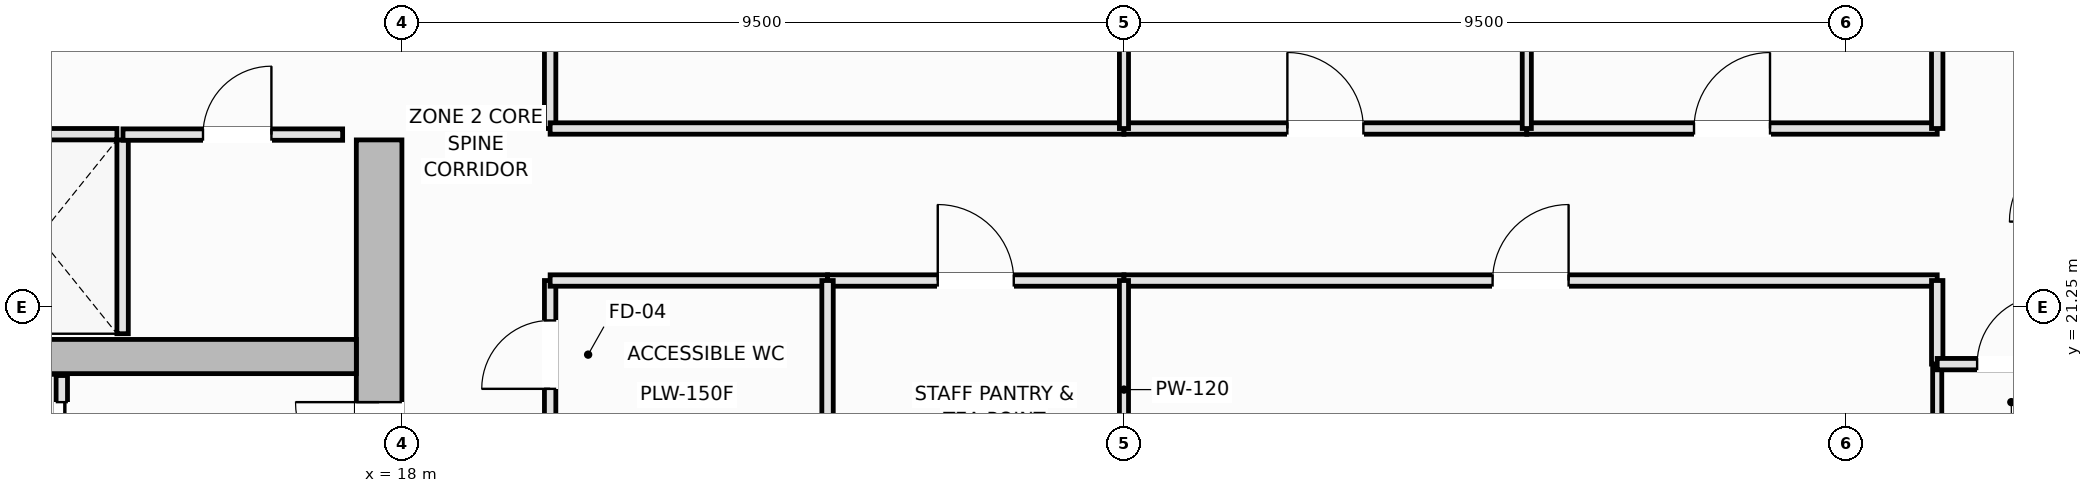
"""IFC4 building model, lengths in metres.
Left out: names, types, materials, properties, quantities, classifications, styles, units other than length and angle.
Written with IfcOpenShell. Run it as: python <this file> out.ifc"""

import sys

from ifc_helpers import new_model, si_unit, direction, frame, frame_2d, origin, place, context, subcontext, project, spatial, rectangle, extrude, element, fill, save


model = new_model("IFC4")
c1 = context("Model", 3, precision=1e-05, world=origin(), true_north=direction((0.0, 1.0)))
c2 = subcontext(c1, "Body", "Model", "MODEL_VIEW")
j1 = project(units=[si_unit("LENGTHUNIT", "METRE"), si_unit("PLANEANGLEUNIT", "RADIAN")], contexts=[c1])
p1 = place(None, origin())
s1 = spatial("IfcSite", under=j1, at=p1, CompositionType="ELEMENT")
p2 = place(p1, origin())
s2 = spatial("IfcBuilding", under=s1, at=p2, CompositionType="ELEMENT")
p3 = place(p2, frame((0.0, 0.0, 169.7)))
s3 = spatial("IfcBuildingStorey", under=s2, at=p3, CompositionType="ELEMENT", Elevation=169.7)
p4 = place(p3, frame((17.7, 14.6, 0.0), z_axis=(0.0, 0.0, 1.0), x_axis=(0.0, 1.0, 0.0)))
e1 = element("IfcWall", 1, at=p4, inside=s3, PredefinedType="SHEAR", context=c2, shape_type="SweptSolid", body=[
    extrude(rectangle(XDim=8.85, YDim=0.6, at=frame_2d((4.425, 0.0))), origin(), (0.0, 0.0, 1.0), 3.55),
])
p5 = place(p4, frame((4.3, 0.0, 0.0)))
e2 = element("IfcOpeningElement", 2, at=p5, cuts=e1, PredefinedType="OPENING", context=c2, shape_type="SweptSolid", body=[
    extrude(rectangle(XDim=1.1, YDim=2.15, at=frame_2d((0.55, 1.075))), frame((0.0, 0.31, 0.0), z_axis=(0.0, -1.0, 0.0), x_axis=(1.0, 0.0, 0.0)), (0.0, 0.0, 1.0), 0.62),
])
p6 = place(p3, frame((5.1, 20.6, 0.0), z_axis=(0.0, 0.0, 1.0), x_axis=(1.0, 0.0, 0.0)))
e3 = element("IfcWall", 3, at=p6, inside=s3, PredefinedType="SHEAR", context=c2, shape_type="SweptSolid", body=[
    extrude(rectangle(XDim=12.3, YDim=0.45, at=frame_2d((6.15, 0.0))), origin(), (0.0, 0.0, 1.0), 3.55),
])
p7 = place(p3, frame((12.2, 23.525, 0.0), z_axis=(0.0, 0.0, 1.0), x_axis=(1.0, 0.0, 0.0)))
e4 = element("IfcWall", 4, at=p7, inside=s3, PredefinedType="PARTITIONING", context=c2, shape_type="SweptSolid", body=[
    extrude(rectangle(XDim=2.05, YDim=0.15, at=frame_2d((1.025, 0.0))), origin(), (0.0, 0.0, 1.0), 3.35),
])
p8 = place(p3, frame((14.325, 20.9, 0.0), z_axis=(0.0, 0.0, 1.0), x_axis=(0.0, 1.0, 0.0)))
e5 = element("IfcWall", 5, at=p8, inside=s3, PredefinedType="PARTITIONING", context=c2, shape_type="SweptSolid", body=[
    extrude(rectangle(XDim=2.55, YDim=0.15, at=frame_2d((1.275, 0.0))), origin(), (0.0, 0.0, 1.0), 3.35),
])
p9 = place(p3, frame((13.525, 18.55, 0.0), z_axis=(0.0, 0.0, 1.0), x_axis=(0.0, 1.0, 0.0)))
e6 = element("IfcWall", 6, at=p9, inside=s3, PredefinedType="PARTITIONING", context=c2, shape_type="SweptSolid", body=[
    extrude(rectangle(XDim=1.8, YDim=0.15, at=frame_2d((0.9, 0.0))), origin(), (0.0, 0.0, 1.0), 3.35),
])
p10 = place(p9, frame((0.35, 0.0, 0.0)))
e7 = element("IfcOpeningElement", 7, at=p10, cuts=e6, PredefinedType="OPENING", context=c2, shape_type="SweptSolid", body=[
    extrude(rectangle(XDim=1.1, YDim=2.2, at=frame_2d((0.55, 1.1))), frame((0.0, 0.085, 0.0), z_axis=(0.0, -1.0, 0.0), x_axis=(1.0, 0.0, 0.0)), (0.0, 0.0, 1.0), 0.17),
])
p11 = place(p3, frame((14.33, 23.52, 0.0), z_axis=(0.0, 0.0, 1.0), x_axis=(1.0, 0.0, 0.0)))
e8 = element("IfcWall", 8, at=p11, inside=s3, PredefinedType="PARTITIONING", context=c2, shape_type="SweptSolid", body=[
    extrude(rectangle(XDim=2.89, YDim=0.15, at=frame_2d((1.445, 0.0))), origin(), (0.0, 0.0, 1.0), 3.35),
])
p12 = place(p11, frame((1.053, 0.0, 0.0)))
e9 = element("IfcOpeningElement", 9, at=p12, cuts=e8, PredefinedType="OPENING", context=c2, shape_type="SweptSolid", body=[
    extrude(rectangle(XDim=0.9, YDim=2.1, at=frame_2d((0.45, 1.05))), frame((0.0, 0.085, 0.0), z_axis=(0.0, -1.0, 0.0), x_axis=(1.0, 0.0, 0.0)), (0.0, 0.0, 1.0), 0.17),
])
p13 = place(p3, frame((19.95, 19.65, 0.0), z_axis=(0.0, 0.0, 1.0), x_axis=(0.0, 1.0, 0.0)))
e10 = element("IfcWall", 10, at=p13, inside=s3, PredefinedType="PLUMBINGWALL", context=c2, shape_type="SweptSolid", body=[
    extrude(rectangle(XDim=1.95, YDim=0.15, at=frame_2d((0.975, 0.0))), origin(), (0.0, 0.0, 1.0), 3.35),
])
p14 = place(p13, frame((0.525, 0.0, 0.0)))
e11 = element("IfcOpeningElement", 11, at=p14, cuts=e10, PredefinedType="OPENING", context=c2, shape_type="SweptSolid", body=[
    extrude(rectangle(XDim=0.9, YDim=2.1, at=frame_2d((0.45, 1.05))), frame((0.0, 0.085, 0.0), z_axis=(0.0, -1.0, 0.0), x_axis=(1.0, 0.0, 0.0)), (0.0, 0.0, 1.0), 0.17),
])
p15 = place(p3, frame((19.95, 23.6, 0.0), z_axis=(0.0, 0.0, 1.0), x_axis=(0.0, 1.0, 0.0)))
e12 = element("IfcWall", 12, at=p15, inside=s3, PredefinedType="PARTITIONING", context=c2, shape_type="SweptSolid", body=[
    extrude(rectangle(XDim=5.2, YDim=0.15, at=frame_2d((2.6, 0.0))), origin(), (0.0, 0.0, 1.0), 3.35),
])
p16 = place(p15, frame((2.1, 0.0, 0.0)))
e13 = element("IfcOpeningElement", 13, at=p16, cuts=e12, PredefinedType="OPENING", context=c2, shape_type="SweptSolid", body=[
    extrude(rectangle(XDim=1.0, YDim=2.15, at=frame_2d((0.5, 1.075))), frame((0.0, 0.085, 0.0), z_axis=(0.0, -1.0, 0.0), x_axis=(1.0, 0.0, 0.0)), (0.0, 0.0, 1.0), 0.17),
])
p17 = place(p3, frame((19.95, 21.6, 0.0), z_axis=(0.0, 0.0, 1.0), x_axis=(1.0, 0.0, 0.0)))
e14 = element("IfcWall", 14, at=p17, inside=s3, PredefinedType="PLUMBINGWALL", context=c2, shape_type="SweptSolid", body=[
    extrude(rectangle(XDim=3.65, YDim=0.15, at=frame_2d((1.825, 0.0))), origin(), (0.0, 0.0, 1.0), 3.35),
])
p18 = place(p3, frame((23.6, 21.6, 0.0), z_axis=(0.0, 0.0, 1.0), x_axis=(1.0, 0.0, 0.0)))
e15 = element("IfcWall", 15, at=p18, inside=s3, PredefinedType="PARTITIONING", context=c2, shape_type="SweptSolid", body=[
    extrude(rectangle(XDim=3.9, YDim=0.15, at=frame_2d((1.95, 0.0))), origin(), (0.0, 0.0, 1.0), 3.35),
])
p19 = place(p18, frame((1.45, 0.0, 0.0)))
e16 = element("IfcOpeningElement", 16, at=p19, cuts=e15, PredefinedType="OPENING", context=c2, shape_type="SweptSolid", body=[
    extrude(rectangle(XDim=1.0, YDim=2.15, at=frame_2d((0.5, 1.075))), frame((0.0, 0.085, 0.0), z_axis=(0.0, -1.0, 0.0), x_axis=(1.0, 0.0, 0.0)), (0.0, 0.0, 1.0), 0.17),
])
p20 = place(p3, frame((19.95, 23.6, 0.0), z_axis=(0.0, 0.0, 1.0), x_axis=(1.0, 0.0, 0.0)))
e17 = element("IfcWall", 17, at=p20, inside=s3, PredefinedType="PARTITIONING", context=c2, shape_type="SweptSolid", body=[
    extrude(rectangle(XDim=7.55, YDim=0.15, at=frame_2d((3.775, 0.0))), origin(), (0.0, 0.0, 1.0), 3.35),
])
p21 = place(p3, frame((27.5, 21.6, 0.0), z_axis=(0.0, 0.0, 1.0), x_axis=(1.0, 0.0, 0.0)))
e18 = element("IfcWall", 18, at=p21, inside=s3, PredefinedType="PARTITIONING", context=c2, shape_type="SweptSolid", body=[
    extrude(rectangle(XDim=10.7, YDim=0.15, at=frame_2d((5.35, 0.0))), origin(), (0.0, 0.0, 1.0), 3.35),
])
p22 = place(p21, frame((4.85, 0.0, 0.0)))
e19 = element("IfcOpeningElement", 19, at=p22, cuts=e18, PredefinedType="OPENING", context=c2, shape_type="SweptSolid", body=[
    extrude(rectangle(XDim=1.0, YDim=2.15, at=frame_2d((0.5, 1.075))), frame((0.0, 0.085, 0.0), z_axis=(0.0, -1.0, 0.0), x_axis=(1.0, 0.0, 0.0)), (0.0, 0.0, 1.0), 0.17),
])
p23 = place(p3, frame((27.5, 23.6, 0.0), z_axis=(0.0, 0.0, 1.0), x_axis=(1.0, 0.0, 0.0)))
e20 = element("IfcWall", 20, at=p23, inside=s3, PredefinedType="PARTITIONING", context=c2, shape_type="SweptSolid", body=[
    extrude(rectangle(XDim=5.3, YDim=0.15, at=frame_2d((2.65, 0.0))), origin(), (0.0, 0.0, 1.0), 3.35),
])
p24 = place(p23, frame((2.15, 0.0, 0.0)))
e21 = element("IfcOpeningElement", 21, at=p24, cuts=e20, PredefinedType="OPENING", context=c2, shape_type="SweptSolid", body=[
    extrude(rectangle(XDim=1.0, YDim=2.15, at=frame_2d((0.5, 1.075))), frame((0.0, 0.085, 0.0), z_axis=(0.0, -1.0, 0.0), x_axis=(1.0, 0.0, 0.0)), (0.0, 0.0, 1.0), 0.17),
])
p25 = place(p3, frame((32.8, 23.6, 0.0), z_axis=(0.0, 0.0, 1.0), x_axis=(1.0, 0.0, 0.0)))
e22 = element("IfcWall", 22, at=p25, inside=s3, PredefinedType="PARTITIONING", context=c2, shape_type="SweptSolid", body=[
    extrude(rectangle(XDim=5.4, YDim=0.15, at=frame_2d((2.7, 0.0))), origin(), (0.0, 0.0, 1.0), 3.35),
])
p26 = place(p25, frame((2.2, 0.0, 0.0)))
e23 = element("IfcOpeningElement", 23, at=p26, cuts=e22, PredefinedType="OPENING", context=c2, shape_type="SweptSolid", body=[
    extrude(rectangle(XDim=1.0, YDim=2.15, at=frame_2d((0.5, 1.075))), frame((0.0, 0.085, 0.0), z_axis=(0.0, -1.0, 0.0), x_axis=(1.0, 0.0, 0.0)), (0.0, 0.0, 1.0), 0.17),
])
p27 = place(p3, frame((23.6, 19.65, 0.0), z_axis=(0.0, 0.0, 1.0), x_axis=(0.0, 1.0, 0.0)))
e24 = element("IfcWall", 24, at=p27, inside=s3, PredefinedType="PLUMBINGWALL", context=c2, shape_type="SweptSolid", body=[
    extrude(rectangle(XDim=1.95, YDim=0.15, at=frame_2d((0.975, 0.0))), origin(), (0.0, 0.0, 1.0), 3.35),
])
p28 = place(p3, frame((27.5, 18.73, 0.0), z_axis=(0.0, 0.0, 1.0), x_axis=(0.0, 1.0, 0.0)))
e25 = element("IfcWall", 25, at=p28, inside=s3, PredefinedType="PARTITIONING", context=c2, shape_type="SweptSolid", body=[
    extrude(rectangle(XDim=2.87, YDim=0.12, at=frame_2d((1.435, 0.0))), origin(), (0.0, 0.0, 1.0), 3.35),
])
p29 = place(p3, frame((27.5, 23.6, 0.0), z_axis=(0.0, 0.0, 1.0), x_axis=(0.0, 1.0, 0.0)))
e26 = element("IfcWall", 26, at=p29, inside=s3, PredefinedType="PARTITIONING", context=c2, shape_type="SweptSolid", body=[
    extrude(rectangle(XDim=5.2, YDim=0.12, at=frame_2d((2.6, 0.0))), origin(), (0.0, 0.0, 1.0), 3.35),
])
p30 = place(p3, frame((38.2, 20.5, 0.0), z_axis=(0.0, 0.0, 1.0), x_axis=(0.0, 1.0, 0.0)))
e27 = element("IfcWall", 27, at=p30, inside=s3, PredefinedType="PARTITIONING", context=c2, shape_type="SweptSolid", body=[
    extrude(rectangle(XDim=1.1, YDim=0.15, at=frame_2d((0.55, 0.0))), origin(), (0.0, 0.0, 1.0), 2.85),
])
p31 = place(p3, frame((38.2, 3.51, 0.0), z_axis=(0.0, 0.0, 1.0), x_axis=(0.0, 1.0, 0.0)))
e28 = element("IfcWall", 28, at=p31, inside=s3, PredefinedType="PARTITIONING", context=c2, shape_type="SweptSolid", body=[
    extrude(rectangle(XDim=16.99, YDim=0.12, at=frame_2d((8.495, 0.0))), origin(), (0.0, 0.0, 1.0), 2.85),
])
p32 = place(p3, frame((32.8, 23.6, 0.0), z_axis=(0.0, 0.0, 1.0), x_axis=(0.0, 1.0, 0.0)))
e29 = element("IfcWall", 29, at=p32, inside=s3, PredefinedType="PARTITIONING", context=c2, shape_type="SweptSolid", body=[
    extrude(rectangle(XDim=22.89, YDim=0.12, at=frame_2d((11.445, 0.0))), origin(), (0.0, 0.0, 1.0), 3.35),
])
p33 = place(p3, frame((38.2, 23.6, 0.0), z_axis=(0.0, 0.0, 1.0), x_axis=(0.0, 1.0, 0.0)))
e30 = element("IfcWall", 30, at=p33, inside=s3, PredefinedType="PARTITIONING", context=c2, shape_type="SweptSolid", body=[
    extrude(rectangle(XDim=6.2, YDim=0.15, at=frame_2d((3.1, 0.0))), origin(), (0.0, 0.0, 1.0), 2.85),
])
p34 = place(p3, frame((38.2, 20.5, 0.0), z_axis=(0.0, 0.0, 1.0), x_axis=(1.0, 0.0, 0.0)))
e31 = element("IfcWall", 31, at=p34, inside=s3, PredefinedType="PARTITIONING", context=c2, shape_type="SweptSolid", body=[
    extrude(rectangle(XDim=1.95, YDim=0.15, at=frame_2d((0.975, 0.0))), origin(), (0.0, 0.0, 1.0), 3.35),
])
p35 = place(p34, frame((0.525, 0.0, 0.0)))
e32 = element("IfcOpeningElement", 32, at=p35, cuts=e31, PredefinedType="OPENING", context=c2, shape_type="SweptSolid", body=[
    extrude(rectangle(XDim=0.9, YDim=2.1, at=frame_2d((0.45, 1.05))), frame((0.0, 0.085, 0.0), z_axis=(0.0, -1.0, 0.0), x_axis=(1.0, 0.0, 0.0)), (0.0, 0.0, 1.0), 0.17),
])
p36 = place(p10, origin())
e33 = element("IfcDoor", 33, at=p36, inside=s3, OperationType="DOUBLE_DOOR_SLIDING", PredefinedType="DOOR", context=c2, shape_type="SweptSolid", body=[
    extrude(rectangle(XDim=1.1, YDim=2.2, at=frame_2d((0.55, 1.1))), frame((0.0, 0.025, 0.0), z_axis=(0.0, -1.0, 0.0), x_axis=(1.0, 0.0, 0.0)), (0.0, 0.0, 1.0), 0.05),
])
fill(e7, e33)
p37 = place(p5, origin())
e34 = element("IfcDoor", 34, at=p37, inside=s3, OperationType="SINGLE_SWING_RIGHT", PredefinedType="DOOR", context=c2, shape_type="SweptSolid", body=[
    extrude(rectangle(XDim=1.1, YDim=2.15, at=frame_2d((0.55, 1.075))), frame((0.0, 0.025, 0.0), z_axis=(0.0, -1.0, 0.0), x_axis=(1.0, 0.0, 0.0)), (0.0, 0.0, 1.0), 0.05),
])
fill(e2, e34)
p38 = place(p12, origin())
e35 = element("IfcDoor", 35, at=p38, inside=s3, OperationType="SINGLE_SWING_RIGHT", PredefinedType="DOOR", context=c2, shape_type="SweptSolid", body=[
    extrude(rectangle(XDim=0.9, YDim=2.1, at=frame_2d((0.45, 1.05))), frame((0.0, 0.025, 0.0), z_axis=(0.0, -1.0, 0.0), x_axis=(1.0, 0.0, 0.0)), (0.0, 0.0, 1.0), 0.05),
])
fill(e9, e35)
p39 = place(p14, origin())
e36 = element("IfcDoor", 36, at=p39, inside=s3, OperationType="SINGLE_SWING_LEFT", PredefinedType="DOOR", context=c2, shape_type="SweptSolid", body=[
    extrude(rectangle(XDim=0.9, YDim=2.1, at=frame_2d((0.45, 1.05))), frame((0.0, 0.025, 0.0), z_axis=(0.0, -1.0, 0.0), x_axis=(1.0, 0.0, 0.0)), (0.0, 0.0, 1.0), 0.05),
])
fill(e11, e36)
p40 = place(p19, origin())
e37 = element("IfcDoor", 37, at=p40, inside=s3, OperationType="SINGLE_SWING_LEFT", PredefinedType="DOOR", context=c2, shape_type="SweptSolid", body=[
    extrude(rectangle(XDim=1.0, YDim=2.15, at=frame_2d((0.5, 1.075))), frame((0.0, 0.025, 0.0), z_axis=(0.0, -1.0, 0.0), x_axis=(1.0, 0.0, 0.0)), (0.0, 0.0, 1.0), 0.05),
])
fill(e16, e37)
p41 = place(p22, origin())
e38 = element("IfcDoor", 38, at=p41, inside=s3, OperationType="SINGLE_SWING_RIGHT", PredefinedType="DOOR", context=c2, shape_type="SweptSolid", body=[
    extrude(rectangle(XDim=1.0, YDim=2.15, at=frame_2d((0.5, 1.075))), frame((0.0, 0.025, 0.0), z_axis=(0.0, -1.0, 0.0), x_axis=(1.0, 0.0, 0.0)), (0.0, 0.0, 1.0), 0.05),
])
fill(e19, e38)
p42 = place(p24, origin())
e39 = element("IfcDoor", 39, at=p42, inside=s3, OperationType="SINGLE_SWING_LEFT", PredefinedType="DOOR", context=c2, shape_type="SweptSolid", body=[
    extrude(rectangle(XDim=1.0, YDim=2.15, at=frame_2d((0.5, 1.075))), frame((0.0, 0.025, 0.0), z_axis=(0.0, -1.0, 0.0), x_axis=(1.0, 0.0, 0.0)), (0.0, 0.0, 1.0), 0.05),
])
fill(e21, e39)
p43 = place(p26, origin())
e40 = element("IfcDoor", 40, at=p43, inside=s3, OperationType="SINGLE_SWING_RIGHT", PredefinedType="DOOR", context=c2, shape_type="SweptSolid", body=[
    extrude(rectangle(XDim=1.0, YDim=2.15, at=frame_2d((0.5, 1.075))), frame((0.0, 0.025, 0.0), z_axis=(0.0, -1.0, 0.0), x_axis=(1.0, 0.0, 0.0)), (0.0, 0.0, 1.0), 0.05),
])
fill(e23, e40)
p44 = place(p35, origin())
e41 = element("IfcDoor", 41, at=p44, inside=s3, OperationType="SINGLE_SWING_RIGHT", PredefinedType="DOOR", context=c2, shape_type="SweptSolid", body=[
    extrude(rectangle(XDim=0.9, YDim=2.1, at=frame_2d((0.45, 1.05))), frame((0.0, 0.025, 0.0), z_axis=(0.0, -1.0, 0.0), x_axis=(1.0, 0.0, 0.0)), (0.0, 0.0, 1.0), 0.05),
])
fill(e32, e41)
save(model, sys.argv[1])
